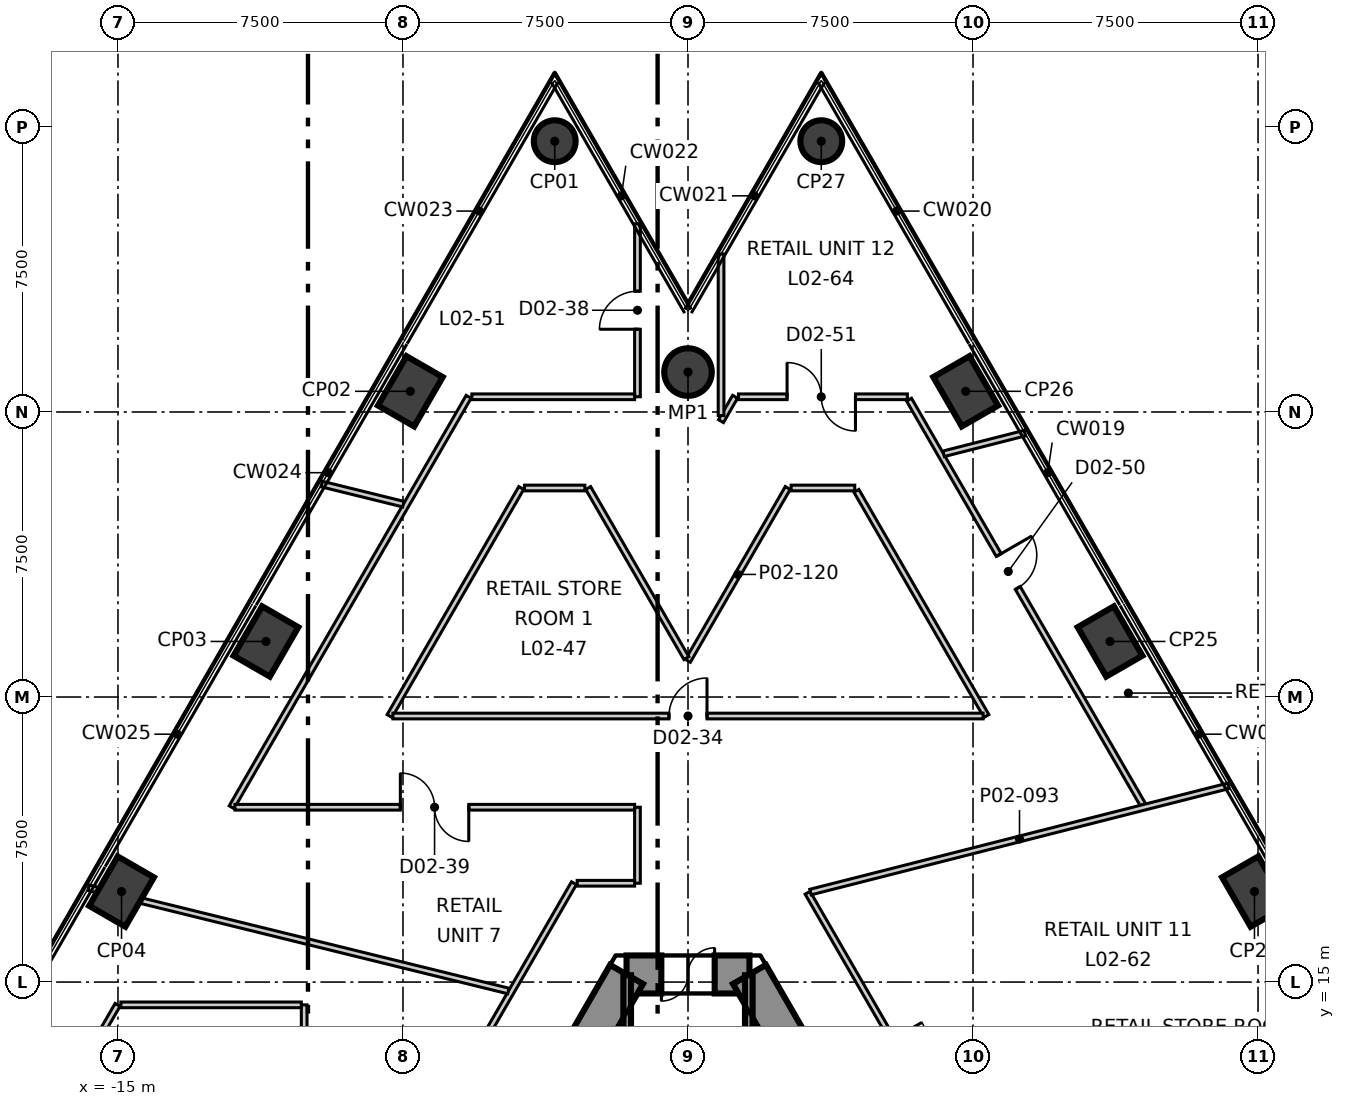
"""IFC4 building model, lengths in metres.
Left out: names, types, materials, properties, quantities, classifications, styles, units other than length and angle.
Written with IfcOpenShell. Run it as: python <this file> out.ifc"""

import sys

from ifc_helpers import new_model, si_unit, direction, frame, frame_2d, origin, origin_2d, place, context, subcontext, project, spatial, polyline, rectangle, circle, outline, extrude, element, fill, save


model = new_model("IFC4")
c1 = context("Model", 3, precision=1e-05, world=origin(), true_north=direction((0.0, 1.0)))
c2 = subcontext(c1, "Body", "Model", "MODEL_VIEW")
j1 = project(units=[si_unit("LENGTHUNIT", "METRE"), si_unit("PLANEANGLEUNIT", "RADIAN")], contexts=[c1])
p1 = place(None, origin())
s1 = spatial("IfcSite", under=j1, at=p1, CompositionType="ELEMENT")
p2 = place(p1, origin())
s2 = spatial("IfcBuilding", under=s1, at=p2, CompositionType="ELEMENT")
p3 = place(p2, frame((0.0, 0.0, 14.5)))
s3 = spatial("IfcBuildingStorey", under=s2, at=p3, CompositionType="ELEMENT", Elevation=14.5)
p4 = place(p3, frame((1.617, 15.2, -0.4), z_axis=(0.0, 0.0, 1.0), x_axis=(-1.0, 0.0, 0.0)))
e1 = element("IfcWall", 1, at=p4, inside=s3, PredefinedType="SHEAR", context=c2, shape_type="SweptSolid", body=[
    extrude(outline(polyline([(-0.288, -0.5), (1.617, -0.5), (3.522, -0.5), (2.945, 0.5), (1.617, 0.5), (0.289, 0.5), (-0.288, -0.5)])), origin(), (0.0, 0.0, 1.0), 5.4),
])
p5 = place(p4, frame((0.917, 0.0, 0.4)))
e2 = element("IfcOpeningElement", 2, at=p5, cuts=e1, PredefinedType="OPENING", context=c2, shape_type="SweptSolid", body=[
    extrude(rectangle(XDim=1.4, YDim=2.1, at=frame_2d((0.7, 1.05))), frame((0.0, 0.51, 0.0), z_axis=(0.0, -1.0, 0.0), x_axis=(1.0, 0.0, 0.0)), (0.0, 0.0, 1.0), 1.02),
])
p6 = place(p3, frame((-1.617, 15.2, -0.4), z_axis=(0.0, 0.0, 1.0), x_axis=(-0.499992141631, -0.866029940768, 0.0)))
e3 = element("IfcWall", 3, at=p6, inside=s3, PredefinedType="SHEAR", context=c2, shape_type="SweptSolid", body=[
    extrude(outline(polyline([(-0.289, -0.499), (1.656, -0.499), (3.601, -0.499), (5.547, -0.499), (7.492, -0.499), (9.437, -0.5), (11.382, -0.5), (13.328, -0.5), (15.273, -0.5), (17.218, -0.5), (19.163, -0.5), (21.109, -0.5), (23.054, -0.5), (24.999, -0.5), (24.422, 0.5), (22.566, 0.5), (20.709, 0.5), (18.853, 0.5), (16.997, 0.5), (15.14, 0.5), (13.284, 0.5), (11.427, 0.5), (9.571, 0.5), (7.715, 0.5), (5.858, 0.5), (4.002, 0.5), (2.146, 0.5), (0.289, 0.5), (-0.289, -0.499)])), origin(), (0.0, 0.0, 1.0), 5.4),
])
p7 = place(p6, frame((11.805, 0.0, 0.4)))
e4 = element("IfcOpeningElement", 4, at=p7, cuts=e3, PredefinedType="OPENING", context=c2, shape_type="SweptSolid", body=[
    extrude(rectangle(XDim=1.1, YDim=2.1, at=frame_2d((0.55, 1.05))), frame((0.0, 0.51, 0.0), z_axis=(0.0, -1.0, 0.0), x_axis=(1.0, 0.0, 0.0)), (0.0, 0.0, 1.0), 1.02),
])
p8 = place(p3, frame((13.972, -6.2, -0.4), z_axis=(0.0, 0.0, 1.0), x_axis=(-0.499992141631, 0.866029940768, 0.0)))
e5 = element("IfcWall", 5, at=p8, inside=s3, PredefinedType="SHEAR", context=c2, shape_type="SweptSolid", body=[
    extrude(outline(polyline([(-0.288, -0.5), (1.657, -0.5), (3.602, -0.5), (5.547, -0.5), (7.493, -0.5), (9.438, -0.5), (11.383, -0.5), (13.328, -0.5), (15.273, -0.5), (17.218, -0.499), (19.164, -0.499), (21.109, -0.499), (23.054, -0.499), (24.999, -0.499), (24.422, 0.5), (22.566, 0.5), (20.709, 0.5), (18.853, 0.5), (16.996, 0.5), (15.14, 0.5), (13.283, 0.5), (11.427, 0.5), (9.57, 0.5), (7.714, 0.5), (5.857, 0.5), (4.001, 0.5), (2.145, 0.5), (0.288, 0.5), (-0.288, -0.5)])), origin(), (0.0, 0.0, 1.0), 5.4),
])
p9 = place(p8, frame((11.455, 0.0, 0.4)))
e6 = element("IfcOpeningElement", 6, at=p9, cuts=e5, PredefinedType="OPENING", context=c2, shape_type="SweptSolid", body=[
    extrude(rectangle(XDim=1.8, YDim=2.1, at=frame_2d((0.9, 1.05))), frame((0.0, 0.51, 0.0), z_axis=(0.0, -1.0, 0.0), x_axis=(1.0, 0.0, 0.0)), (0.0, 0.0, 1.0), 1.02),
])
p10 = place(p3, frame((-3.507, 37.125, -0.4), z_axis=(0.0, 0.0, 1.0), x_axis=(0.5, 0.866025403784, 0.0)))
e7 = element("IfcColumn", 7, at=p10, inside=s3, PredefinedType="COLUMN", context=c2, shape_type="SweptSolid", body=[
    extrude(circle(Radius=0.55, at=origin_2d()), origin(), (0.0, 0.0, 1.0), 5.4),
])
for number, where, z_axis, x_axis in (
    (8, (-7.307, 30.544, -0.4), (0.0, 0.0, 1.0), (0.5, 0.866, 0.0)),
    (9, (-11.106, 23.962, -0.4), (0.0, 0.0, 1.0), (0.5, 0.866, 0.0)),
    (10, (-14.906, 17.381, -0.4), (0.0, 0.0, 1.0), (0.5, 0.866, 0.0)),
    (11, (14.906, 17.381, -0.4), (0.0, 0.0, 1.0), (-0.5, 0.866, 0.0)),
    (12, (11.106, 23.962, -0.4), (0.0, 0.0, 1.0), (-0.5, 0.866, 0.0)),
    (13, (7.307, 30.544, -0.4), (0.0, 0.0, 1.0), (-0.5, 0.866, 0.0)),
):
    element("IfcColumn", number, at=place(p3, frame(where, z_axis=z_axis, x_axis=x_axis)), inside=s3, PredefinedType="COLUMN", context=c2, shape_type="SweptSolid", body=[
        extrude(rectangle(XDim=1.5, YDim=1.1, at=origin_2d()), origin(), (0.0, 0.0, 1.0), 5.4),
    ])
p11 = place(p3, frame((3.507, 37.125, -0.4), z_axis=(0.0, 0.0, 1.0), x_axis=(-0.5, 0.866025403784, 0.0)))
e14 = element("IfcColumn", 14, at=p11, inside=s3, PredefinedType="COLUMN", context=c2, shape_type="SweptSolid", body=[
    extrude(circle(Radius=0.55, at=origin_2d()), origin(), (0.0, 0.0, 1.0), 5.4),
])
p12 = place(p3, frame((0.0, 31.05, -0.4), z_axis=(0.0, 0.0, 1.0), x_axis=(1.0, 0.0, 0.0)))
e15 = element("IfcColumn", 15, at=p12, inside=s3, PredefinedType="COLUMN", context=c2, shape_type="SweptSolid", body=[
    extrude(circle(Radius=0.625, at=origin_2d()), origin(), (0.0, 0.0, 1.0), 5.4),
])
p13 = place(p3, frame((0.868, 29.759, 0.0), z_axis=(0.0, 0.0, 1.0), x_axis=(0.500529943435, 0.865719224533, 0.0)))
e16 = element("IfcWall", 16, at=p13, inside=s3, PredefinedType="PARTITIONING", context=c2, shape_type="SweptSolid", body=[
    extrude(rectangle(XDim=0.741, YDim=0.15, at=frame_2d((0.371, 0.0))), origin(), (0.0, 0.0, 1.0), 5.0),
])
p14 = place(p3, frame((-23.556, -0.4, 0.0), z_axis=(0.0, 0.0, 1.0), x_axis=(0.500011000363, 0.866019052629, 0.0)))
e17 = element("IfcWall", 17, at=p14, inside=s3, PredefinedType="PARTITIONING", context=c2, shape_type="SweptSolid", body=[
    extrude(rectangle(XDim=17.089, YDim=0.15, at=frame_2d((8.545, 0.0))), origin(), (0.0, 0.0, 1.0), 5.0),
])
p15 = place(p3, frame((-12.009, 19.6, 0.0), z_axis=(0.0, 0.0, 1.0), x_axis=(0.50004894341, 0.86599714445, 0.0)))
e18 = element("IfcWall", 18, at=p15, inside=s3, PredefinedType="PARTITIONING", context=c2, shape_type="SweptSolid", body=[
    extrude(rectangle(XDim=12.471, YDim=0.15, at=frame_2d((6.235, 0.0))), origin(), (0.0, 0.0, 1.0), 5.0),
])
p16 = place(p3, frame((-10.1, 5.306, 0.0), z_axis=(0.0, 0.0, 1.0), x_axis=(0.500004804517, 0.866022629878, 0.0)))
e19 = element("IfcWall", 19, at=p16, inside=s3, PredefinedType="PARTITIONING", context=c2, shape_type="SweptSolid", body=[
    extrude(rectangle(XDim=14.196, YDim=0.15, at=frame_2d((7.098, 0.0))), origin(), (0.0, 0.0, 1.0), 5.0),
])
p17 = place(p16, frame((4.951, 0.0, 0.0)))
e20 = element("IfcOpeningElement", 20, at=p17, cuts=e19, PredefinedType="OPENING", context=c2, shape_type="SweptSolid", body=[
    extrude(rectangle(XDim=1.0, YDim=2.1, at=frame_2d((0.5, 1.05))), frame((0.0, 0.085, 0.0), z_axis=(0.0, -1.0, 0.0), x_axis=(1.0, 0.0, 0.0)), (0.0, 0.0, 1.0), 0.17),
])
p18 = place(p3, frame((-10.1, 5.456, 0.0), z_axis=(0.0, 0.0, 1.0), x_axis=(0.0, 1.0, 0.0)))
e21 = element("IfcWall", 21, at=p18, inside=s3, PredefinedType="PARTITIONING", context=c2, shape_type="SweptSolid", body=[
    extrude(rectangle(XDim=8.944, YDim=0.15, at=frame_2d((4.472, 0.0))), origin(), (0.0, 0.0, 1.0), 5.0),
])
p19 = place(p3, frame((-14.924, 14.4, 0.0), z_axis=(0.0, 0.0, 1.0), x_axis=(1.0, 0.0, 0.0)))
e22 = element("IfcWall", 22, at=p19, inside=s3, PredefinedType="PARTITIONING", context=c2, shape_type="SweptSolid", body=[
    extrude(rectangle(XDim=4.749, YDim=0.15, at=frame_2d((2.375, 0.0))), origin(), (0.0, 0.0, 1.0), 5.0),
])
p20 = place(p3, frame((-15.772, 17.482, 0.0), z_axis=(0.0, 0.0, 1.0), x_axis=(0.971054639106, -0.2388574635, 0.0)))
e23 = element("IfcWall", 23, at=p20, inside=s3, PredefinedType="PARTITIONING", context=c2, shape_type="SweptSolid", body=[
    extrude(rectangle(XDim=11.375, YDim=0.15, at=frame_2d((5.688, 0.0))), origin(), (0.0, 0.0, 1.0), 5.0),
])
p21 = place(p3, frame((-9.639, 28.104, 0.0), z_axis=(0.0, 0.0, 1.0), x_axis=(0.970980584994, -0.239158323219, 0.0)))
e24 = element("IfcWall", 24, at=p21, inside=s3, PredefinedType="PARTITIONING", context=c2, shape_type="SweptSolid", body=[
    extrude(rectangle(XDim=2.212, YDim=0.15, at=frame_2d((1.106, 0.0))), origin(), (0.0, 0.0, 1.0), 5.0),
])
p22 = place(p3, frame((-1.33, 17.6, 0.0), z_axis=(0.0, 0.0, 1.0), x_axis=(0.0, 1.0, 0.0)))
e25 = element("IfcWall", 25, at=p22, inside=s3, PredefinedType="PARTITIONING", context=c2, shape_type="SweptSolid", body=[
    extrude(rectangle(XDim=2.0, YDim=0.15, at=frame_2d((1.0, 0.0))), origin(), (0.0, 0.0, 1.0), 4.15),
])
p23 = place(p3, frame((-1.33, 30.4, 0.0), z_axis=(0.0, 0.0, 1.0), x_axis=(0.0, 1.0, 0.0)))
e26 = element("IfcWall", 26, at=p23, inside=s3, PredefinedType="PARTITIONING", context=c2, shape_type="SweptSolid", body=[
    extrude(rectangle(XDim=4.553, YDim=0.15, at=frame_2d((2.276, 0.0))), origin(), (0.0, 0.0, 1.0), 5.0),
])
p24 = place(p23, frame((1.777, 0.0, 0.0)))
e27 = element("IfcOpeningElement", 27, at=p24, cuts=e26, PredefinedType="OPENING", context=c2, shape_type="SweptSolid", body=[
    extrude(rectangle(XDim=1.0, YDim=2.1, at=frame_2d((0.5, 1.05))), frame((0.0, 0.085, 0.0), z_axis=(0.0, -1.0, 0.0), x_axis=(1.0, 0.0, 0.0)), (0.0, 0.0, 1.0), 0.17),
])
p25 = place(p3, frame((-5.687, 30.4, 0.0), z_axis=(0.0, 0.0, 1.0), x_axis=(1.0, 0.0, 0.0)))
e28 = element("IfcWall", 28, at=p25, inside=s3, PredefinedType="PARTITIONING", context=c2, shape_type="SweptSolid", body=[
    extrude(rectangle(XDim=4.282, YDim=0.15, at=frame_2d((2.141, 0.0))), origin(), (0.0, 0.0, 1.0), 5.0),
])
p26 = place(p3, frame((1.328, 30.4, 0.0), z_axis=(0.0, 0.0, 1.0), x_axis=(1.0, 0.0, 0.0)))
e29 = element("IfcWall", 29, at=p26, inside=s3, PredefinedType="PARTITIONING", context=c2, shape_type="SweptSolid", body=[
    extrude(rectangle(XDim=4.445, YDim=0.15, at=frame_2d((2.223, 0.0))), origin(), (0.0, 0.0, 1.0), 5.0),
])
p27 = place(p26, frame((1.279, 0.0, 0.0)))
e30 = element("IfcOpeningElement", 30, at=p27, cuts=e29, PredefinedType="OPENING", context=c2, shape_type="SweptSolid", body=[
    extrude(rectangle(XDim=1.8, YDim=2.1, at=frame_2d((0.9, 1.05))), frame((0.0, 0.085, 0.0), z_axis=(0.0, -1.0, 0.0), x_axis=(1.0, 0.0, 0.0)), (0.0, 0.0, 1.0), 0.17),
])
p28 = place(p3, frame((-11.922, 19.6, 0.0), z_axis=(0.0, 0.0, 1.0), x_axis=(1.0, 0.0, 0.0)))
e31 = element("IfcWall", 31, at=p28, inside=s3, PredefinedType="PARTITIONING", context=c2, shape_type="SweptSolid", body=[
    extrude(rectangle(XDim=10.517, YDim=0.15, at=frame_2d((5.259, 0.0))), origin(), (0.0, 0.0, 1.0), 5.0),
])
p29 = place(p28, frame((4.353, 0.0, 0.0)))
e32 = element("IfcOpeningElement", 32, at=p29, cuts=e31, PredefinedType="OPENING", context=c2, shape_type="SweptSolid", body=[
    extrude(rectangle(XDim=1.8, YDim=2.1, at=frame_2d((0.9, 1.05))), frame((0.0, 0.085, 0.0), z_axis=(0.0, -1.0, 0.0), x_axis=(1.0, 0.0, 0.0)), (0.0, 0.0, 1.0), 0.17),
])
p30 = place(p3, frame((-2.916, 17.6, 0.0), z_axis=(0.0, 0.0, 1.0), x_axis=(1.0, 0.0, 0.0)))
e33 = element("IfcWall", 33, at=p30, inside=s3, PredefinedType="PARTITIONING", context=c2, shape_type="SweptSolid", body=[
    extrude(rectangle(XDim=1.511, YDim=0.15, at=frame_2d((0.755, 0.0))), origin(), (0.0, 0.0, 1.0), 5.0),
])
p31 = place(p3, frame((5.816, 30.325, 0.0), z_axis=(0.0, 0.0, 1.0), x_axis=(0.500075634353, -0.865981731866, 0.0)))
e34 = element("IfcWall", 34, at=p31, inside=s3, PredefinedType="PARTITIONING", context=c2, shape_type="SweptSolid", body=[
    extrude(rectangle(XDim=12.306, YDim=0.15, at=frame_2d((6.153, 0.0))), origin(), (0.0, 0.0, 1.0), 5.0),
])
p32 = place(p31, frame((4.722, 0.0, 0.0)))
e35 = element("IfcOpeningElement", 35, at=p32, cuts=e34, PredefinedType="OPENING", context=c2, shape_type="SweptSolid", body=[
    extrude(rectangle(XDim=1.0, YDim=2.1, at=frame_2d((0.5, 1.05))), frame((0.0, 0.085, 0.0), z_axis=(0.0, -1.0, 0.0), x_axis=(1.0, 0.0, 0.0)), (0.0, 0.0, 1.0), 0.17),
])
p33 = place(p3, frame((0.87, 29.907, 0.0), z_axis=(0.0, 0.0, 1.0), x_axis=(0.0, 1.0, 0.0)))
e36 = element("IfcWall", 36, at=p33, inside=s3, PredefinedType="PARTITIONING", context=c2, shape_type="SweptSolid", body=[
    extrude(rectangle(XDim=4.251, YDim=0.15, at=frame_2d((2.125, 0.0))), origin(), (0.0, 0.0, 1.0), 5.0),
])
p34 = place(p3, frame((6.726, 28.9, 0.0), z_axis=(0.0, 0.0, 1.0), x_axis=(0.969125534663, 0.246567836636, 0.0)))
e37 = element("IfcWall", 37, at=p34, inside=s3, PredefinedType="PARTITIONING", context=c2, shape_type="SweptSolid", body=[
    extrude(rectangle(XDim=2.207, YDim=0.15, at=frame_2d((1.104, 0.0))), origin(), (0.0, 0.0, 1.0), 5.0),
])
p35 = place(p3, frame((3.147, 17.349, 0.0), z_axis=(0.0, 0.0, 1.0), x_axis=(0.500060803479, -0.865990296034, 0.0)))
e38 = element("IfcWall", 38, at=p35, inside=s3, PredefinedType="PARTITIONING", context=c2, shape_type="SweptSolid", body=[
    extrude(rectangle(XDim=10.639, YDim=0.15, at=frame_2d((5.319, 0.0))), origin(), (0.0, 0.0, 1.0), 5.0),
])
p36 = place(p35, frame((4.458, 0.0, 0.0)))
e39 = element("IfcOpeningElement", 39, at=p36, cuts=e38, PredefinedType="OPENING", context=c2, shape_type="SweptSolid", body=[
    extrude(rectangle(XDim=1.8, YDim=2.1, at=frame_2d((0.9, 1.05))), frame((0.0, 0.085, 0.0), z_axis=(0.0, -1.0, 0.0), x_axis=(1.0, 0.0, 0.0)), (0.0, 0.0, 1.0), 0.17),
])
p37 = place(p3, frame((3.223, 17.368, 0.0), z_axis=(0.0, 0.0, 1.0), x_axis=(0.969205432145, 0.246253589415, 0.0)))
e40 = element("IfcWall", 40, at=p37, inside=s3, PredefinedType="PARTITIONING", context=c2, shape_type="SweptSolid", body=[
    extrude(rectangle(XDim=11.351, YDim=0.15, at=frame_2d((5.675, 0.0))), origin(), (0.0, 0.0, 1.0), 5.0),
])
p38 = place(p3, frame((-7.852, 22.0, 0.0), z_axis=(0.0, 0.0, 1.0), x_axis=(0.500001051461, 0.866024796723, 0.0)))
e41 = element("IfcWall", 41, at=p38, inside=s3, PredefinedType="PARTITIONING", context=c2, shape_type="SweptSolid", body=[
    extrude(rectangle(XDim=6.928, YDim=0.15, at=frame_2d((3.464, 0.0))), origin(), (0.0, 0.0, 1.0), 5.0),
])
p39 = place(p3, frame((-0.003, 23.451, 0.0), z_axis=(0.0, 0.0, 1.0), x_axis=(0.500136703138, 0.865946463804, 0.0)))
e42 = element("IfcWall", 42, at=p39, inside=s3, PredefinedType="PARTITIONING", context=c2, shape_type="SweptSolid", body=[
    extrude(rectangle(XDim=5.254, YDim=0.15, at=frame_2d((2.627, 0.0))), origin(), (0.0, 0.0, 1.0), 5.0),
])
p40 = place(p3, frame((-2.627, 28.0, 0.0), z_axis=(0.0, 0.0, 1.0), x_axis=(0.499959617396, -0.866048717436, 0.0)))
e43 = element("IfcWall", 43, at=p40, inside=s3, PredefinedType="PARTITIONING", context=c2, shape_type="SweptSolid", body=[
    extrude(rectangle(XDim=5.168, YDim=0.15, at=frame_2d((2.584, 0.0))), origin(), (0.0, 0.0, 1.0), 5.0),
])
p41 = place(p3, frame((-4.301, 28.0, 0.0), z_axis=(0.0, 0.0, 1.0), x_axis=(1.0, 0.0, 0.0)))
e44 = element("IfcWall", 44, at=p41, inside=s3, PredefinedType="PARTITIONING", context=c2, shape_type="SweptSolid", body=[
    extrude(rectangle(XDim=1.587, YDim=0.15, at=frame_2d((0.793, 0.0))), origin(), (0.0, 0.0, 1.0), 5.0),
])
p42 = place(p3, frame((2.714, 28.0, 0.0), z_axis=(0.0, 0.0, 1.0), x_axis=(1.0, 0.0, 0.0)))
e45 = element("IfcWall", 45, at=p42, inside=s3, PredefinedType="PARTITIONING", context=c2, shape_type="SweptSolid", body=[
    extrude(rectangle(XDim=1.674, YDim=0.15, at=frame_2d((0.837, 0.0))), origin(), (0.0, 0.0, 1.0), 5.0),
])
p43 = place(p3, frame((4.431, 27.925, 0.0), z_axis=(0.0, 0.0, 1.0), x_axis=(0.500034424931, -0.866005527629, 0.0)))
e46 = element("IfcWall", 46, at=p43, inside=s3, PredefinedType="PARTITIONING", context=c2, shape_type="SweptSolid", body=[
    extrude(rectangle(XDim=6.842, YDim=0.15, at=frame_2d((3.421, 0.0))), origin(), (0.0, 0.0, 1.0), 5.0),
])
p44 = place(p3, frame((-7.765, 22.0, 0.0), z_axis=(0.0, 0.0, 1.0), x_axis=(1.0, 0.0, 0.0)))
e47 = element("IfcWall", 47, at=p44, inside=s3, PredefinedType="PARTITIONING", context=c2, shape_type="SweptSolid", body=[
    extrude(rectangle(XDim=15.53, YDim=0.15, at=frame_2d((7.765, 0.0))), origin(), (0.0, 0.0, 1.0), 5.0),
])
p45 = place(p44, frame((7.265, 0.0, 0.0)))
e48 = element("IfcOpeningElement", 48, at=p45, cuts=e47, PredefinedType="OPENING", context=c2, shape_type="SweptSolid", body=[
    extrude(rectangle(XDim=1.0, YDim=2.1, at=frame_2d((0.5, 1.05))), frame((0.0, 0.085, 0.0), z_axis=(0.0, -1.0, 0.0), x_axis=(1.0, 0.0, 0.0)), (0.0, 0.0, 1.0), 0.17),
])
for number, where, z_axis, x_axis in (
    (49, (1.6, 6.615, 0.0), (0.0, 0.0, 1.0), (0.0, 1.0, 0.0)),
    (50, (-1.6, 6.615, 0.0), (0.0, 0.0, 1.0), (0.0, 1.0, 0.0)),
):
    element("IfcWall", number, at=place(p3, frame(where, z_axis=z_axis, x_axis=x_axis)), inside=s3, PredefinedType="SOLIDWALL", context=c2, shape_type="SweptSolid", body=[
        extrude(rectangle(XDim=8.565, YDim=0.2, at=frame_2d((4.282, 0.0))), origin(), (0.0, 0.0, 1.0), 5.0),
    ])
p46 = place(p45, origin())
e51 = element("IfcDoor", 51, at=p46, inside=s3, OperationType="SINGLE_SWING_LEFT", PredefinedType="DOOR", context=c2, shape_type="SweptSolid", body=[
    extrude(rectangle(XDim=1.0, YDim=2.1, at=frame_2d((0.5, 1.05))), frame((0.0, 0.025, 0.0), z_axis=(0.0, -1.0, 0.0), x_axis=(1.0, 0.0, 0.0)), (0.0, 0.0, 1.0), 0.05),
])
fill(e48, e51)
p47 = place(p24, origin())
e52 = element("IfcDoor", 52, at=p47, inside=s3, OperationType="SINGLE_SWING_RIGHT", PredefinedType="DOOR", context=c2, shape_type="SweptSolid", body=[
    extrude(rectangle(XDim=1.0, YDim=2.1, at=frame_2d((0.5, 1.05))), frame((0.0, 0.025, 0.0), z_axis=(0.0, -1.0, 0.0), x_axis=(1.0, 0.0, 0.0)), (0.0, 0.0, 1.0), 0.05),
])
fill(e27, e52)
p48 = place(p29, origin())
e53 = element("IfcDoor", 53, at=p48, inside=s3, OperationType="DOUBLE_DOOR_SINGLE_SWING", PredefinedType="DOOR", context=c2, shape_type="SweptSolid", body=[
    extrude(rectangle(XDim=1.8, YDim=2.1, at=frame_2d((0.9, 1.05))), frame((0.0, 0.025, 0.0), z_axis=(0.0, -1.0, 0.0), x_axis=(1.0, 0.0, 0.0)), (0.0, 0.0, 1.0), 0.05),
])
fill(e32, e53)
p49 = place(p32, origin())
e54 = element("IfcDoor", 54, at=p49, inside=s3, OperationType="SINGLE_SWING_RIGHT", PredefinedType="DOOR", context=c2, shape_type="SweptSolid", body=[
    extrude(rectangle(XDim=1.0, YDim=2.1, at=frame_2d((0.5, 1.05))), frame((0.0, 0.025, 0.0), z_axis=(0.0, -1.0, 0.0), x_axis=(1.0, 0.0, 0.0)), (0.0, 0.0, 1.0), 0.05),
])
fill(e35, e54)
p50 = place(p27, origin())
e55 = element("IfcDoor", 55, at=p50, inside=s3, OperationType="DOUBLE_DOOR_SINGLE_SWING", PredefinedType="DOOR", context=c2, shape_type="SweptSolid", body=[
    extrude(rectangle(XDim=1.8, YDim=2.1, at=frame_2d((0.9, 1.05))), frame((0.0, 0.025, 0.0), z_axis=(0.0, -1.0, 0.0), x_axis=(1.0, 0.0, 0.0)), (0.0, 0.0, 1.0), 0.05),
])
fill(e30, e55)
p51 = place(p5, origin())
e56 = element("IfcDoor", 56, at=p51, inside=s3, OperationType="DOUBLE_DOOR_SINGLE_SWING", PredefinedType="DOOR", context=c2, shape_type="SweptSolid", body=[
    extrude(rectangle(XDim=1.4, YDim=2.1, at=frame_2d((0.7, 1.05))), frame((0.0, 0.025, 0.0), z_axis=(0.0, -1.0, 0.0), x_axis=(1.0, 0.0, 0.0)), (0.0, 0.0, 1.0), 0.05),
])
fill(e2, e56)
save(model, sys.argv[1])
